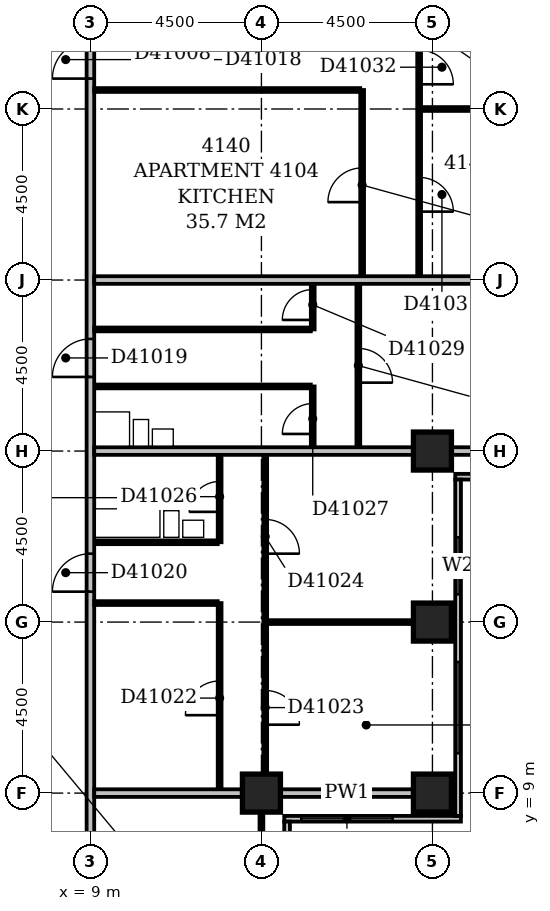
"""IFC4 building model, lengths in metres.
Left out: names, types, materials, properties, quantities, classifications, styles, units other than length and angle.
Written with IfcOpenShell. Run it as: python <this file> out.ifc"""

import sys

from ifc_helpers import new_model, si_unit, direction, frame, frame_2d, origin, origin_2d, place, context, subcontext, project, spatial, rectangle, extrude, element, fill, save


model = new_model("IFC4")
c1 = context("Model", 3, precision=1e-05, world=origin(), true_north=direction((0.0, 1.0)))
c2 = subcontext(c1, "Body", "Model", "MODEL_VIEW")
j1 = project(units=[si_unit("LENGTHUNIT", "METRE"), si_unit("PLANEANGLEUNIT", "RADIAN")], contexts=[c1])
p1 = place(None, origin())
s1 = spatial("IfcSite", under=j1, at=p1, CompositionType="ELEMENT")
p2 = place(p1, origin())
s2 = spatial("IfcBuilding", under=s1, at=p2, CompositionType="ELEMENT")
p3 = place(p2, frame((0.0, 0.0, 162.8)))
s3 = spatial("IfcBuildingStorey", under=s2, at=p3, CompositionType="ELEMENT", Elevation=162.8)
for number, where, z_axis, x_axis in (
    (1, (13.5, 9.0, -0.3), (0.0, 0.0, 1.0), (1.0, 0.0, 0.0)),
    (2, (18.0, 9.0, -0.3), (0.0, 0.0, 1.0), (1.0, 0.0, 0.0)),
    (3, (18.0, 13.5, -0.3), (0.0, 0.0, 1.0), (1.0, 0.0, 0.0)),
    (4, (18.0, 18.0, -0.3), (0.0, 0.0, 1.0), (1.0, 0.0, 0.0)),
):
    element("IfcColumn", number, at=place(p3, frame(where, z_axis=z_axis, x_axis=x_axis)), inside=s3, PredefinedType="COLUMN", context=c2, shape_type="SweptSolid", body=[
        extrude(rectangle(XDim=1.0, YDim=1.0, at=origin_2d()), origin(), (0.0, 0.0, 1.0), 3.6),
    ])
p4 = place(p3, frame((14.175, 3.9, 0.0), z_axis=(0.0, 0.0, 1.0), x_axis=(0.0, 1.0, 0.0)))
e5 = element("IfcWall", 5, at=p4, inside=s3, PredefinedType="STANDARD", context=c2, shape_type="SweptSolid", body=[
    extrude(rectangle(XDim=4.35, YDim=0.15, at=frame_2d((2.175, 0.0))), origin(), (0.0, 0.0, 1.0), 2.7),
])
p5 = place(p4, frame((1.65, 0.0, 0.6)))
e6 = element("IfcOpeningElement", 6, at=p5, cuts=e5, PredefinedType="OPENING", context=c2, shape_type="SweptSolid", body=[
    extrude(rectangle(XDim=2.4, YDim=1.8, at=frame_2d((1.2, 0.9))), frame((0.0, 0.087, 0.0), z_axis=(0.0, -1.0, 0.0), x_axis=(1.0, 0.0, 0.0)), (0.0, 0.0, 1.0), 0.174),
])
p6 = place(p3, frame((14.1, 8.325, 0.0), z_axis=(0.0, 0.0, 1.0), x_axis=(1.0, 0.0, 0.0)))
e7 = element("IfcWall", 7, at=p6, inside=s3, PredefinedType="STANDARD", context=c2, shape_type="SweptSolid", body=[
    extrude(rectangle(XDim=4.65, YDim=0.15, at=frame_2d((2.325, 0.0))), origin(), (0.0, 0.0, 1.0), 2.7),
])
p7 = place(p6, frame((0.45, 0.0, 0.6)))
e8 = element("IfcOpeningElement", 8, at=p7, cuts=e7, PredefinedType="OPENING", context=c2, shape_type="SweptSolid", body=[
    extrude(rectangle(XDim=2.4, YDim=1.8, at=frame_2d((1.2, 0.9))), frame((0.0, 0.087, 0.0), z_axis=(0.0, -1.0, 0.0), x_axis=(1.0, 0.0, 0.0)), (0.0, 0.0, 1.0), 0.174),
])
p8 = place(p3, frame((18.675, 8.4, 0.0), z_axis=(0.0, 0.0, 1.0), x_axis=(0.0, 1.0, 0.0)))
e9 = element("IfcWall", 9, at=p8, inside=s3, PredefinedType="STANDARD", context=c2, shape_type="SweptSolid", body=[
    extrude(rectangle(XDim=8.85, YDim=0.15, at=frame_2d((4.425, 0.0))), origin(), (0.0, 0.0, 1.0), 2.7),
])
p9 = place(p8, frame((1.65, 0.0, 0.6)))
e10 = element("IfcOpeningElement", 10, at=p9, cuts=e9, PredefinedType="OPENING", context=c2, shape_type="SweptSolid", body=[
    extrude(rectangle(XDim=2.4, YDim=1.8, at=frame_2d((1.2, 0.9))), frame((0.0, 0.087, 0.0), z_axis=(0.0, -1.0, 0.0), x_axis=(1.0, 0.0, 0.0)), (0.0, 0.0, 1.0), 0.174),
])
p10 = place(p8, frame((5.83, 0.0, 0.6)))
e11 = element("IfcOpeningElement", 11, at=p10, cuts=e9, PredefinedType="OPENING", context=c2, shape_type="SweptSolid", body=[
    extrude(rectangle(XDim=1.5, YDim=1.8, at=frame_2d((0.75, 0.9))), frame((0.0, 0.087, 0.0), z_axis=(0.0, -1.0, 0.0), x_axis=(1.0, 0.0, 0.0)), (0.0, 0.0, 1.0), 0.174),
])
p11 = place(p3, frame((18.6, 17.325, 0.0), z_axis=(0.0, 0.0, 1.0), x_axis=(1.0, 0.0, 0.0)))
e12 = element("IfcWall", 12, at=p11, inside=s3, PredefinedType="STANDARD", context=c2, shape_type="SweptSolid", body=[
    extrude(rectangle(XDim=4.65, YDim=0.15, at=frame_2d((2.325, 0.0))), origin(), (0.0, 0.0, 1.0), 2.7),
])
p12 = place(p11, frame((0.706, 0.0, 0.6)))
e13 = element("IfcOpeningElement", 13, at=p12, cuts=e12, PredefinedType="OPENING", context=c2, shape_type="SweptSolid", body=[
    extrude(rectangle(XDim=2.4, YDim=1.8, at=frame_2d((1.2, 0.9))), frame((0.0, 0.087, 0.0), z_axis=(0.0, -1.0, 0.0), x_axis=(1.0, 0.0, 0.0)), (0.0, 0.0, 1.0), 0.174),
])
p13 = place(p3, frame((9.0, 5.0, 0.0), z_axis=(0.0, 0.0, 1.0), x_axis=(0.0, 1.0, 0.0)))
e14 = element("IfcWall", 14, at=p13, inside=s3, PredefinedType="PARTITIONING", context=c2, shape_type="SweptSolid", body=[
    extrude(rectangle(XDim=27.75, YDim=0.2, at=frame_2d((13.875, 0.0))), origin(), (0.0, 0.0, 1.0), 3.3),
])
p14 = place(p13, frame((22.8, 0.0, 0.0)))
e15 = element("IfcOpeningElement", 15, at=p14, cuts=e14, PredefinedType="OPENING", context=c2, shape_type="SweptSolid", body=[
    extrude(rectangle(XDim=1.0, YDim=2.1, at=frame_2d((0.5, 1.05))), frame((0.0, 0.112, 0.0), z_axis=(0.0, -1.0, 0.0), x_axis=(1.0, 0.0, 0.0)), (0.0, 0.0, 1.0), 0.224),
])
p15 = place(p13, frame((14.95, 0.0, 0.0)))
e16 = element("IfcOpeningElement", 16, at=p15, cuts=e14, PredefinedType="OPENING", context=c2, shape_type="SweptSolid", body=[
    extrude(rectangle(XDim=1.0, YDim=2.1, at=frame_2d((0.5, 1.05))), frame((0.0, 0.112, 0.0), z_axis=(0.0, -1.0, 0.0), x_axis=(1.0, 0.0, 0.0)), (0.0, 0.0, 1.0), 0.224),
])
p16 = place(p13, frame((9.3, 0.0, 0.0)))
e17 = element("IfcOpeningElement", 17, at=p16, cuts=e14, PredefinedType="OPENING", context=c2, shape_type="SweptSolid", body=[
    extrude(rectangle(XDim=1.0, YDim=2.1, at=frame_2d((0.5, 1.05))), frame((0.0, 0.112, 0.0), z_axis=(0.0, -1.0, 0.0), x_axis=(1.0, 0.0, 0.0)), (0.0, 0.0, 1.0), 0.224),
])
p17 = place(p13, frame((1.5, 0.0, 0.0)))
e18 = element("IfcOpeningElement", 18, at=p17, cuts=e14, PredefinedType="OPENING", context=c2, shape_type="SweptSolid", body=[
    extrude(rectangle(XDim=0.9, YDim=2.1, at=frame_2d((0.45, 1.05))), frame((0.0, 0.112, 0.0), z_axis=(0.0, -1.0, 0.0), x_axis=(1.0, 0.0, 0.0)), (0.0, 0.0, 1.0), 0.224),
])
p18 = place(p3, frame((13.5, 5.0, 0.0), z_axis=(0.0, 0.0, 1.0), x_axis=(0.0, 1.0, 0.0)))
e19 = element("IfcWall", 19, at=p18, inside=s3, PredefinedType="PARTITIONING", context=c2, shape_type="SweptSolid", body=[
    extrude(rectangle(XDim=3.5, YDim=0.1, at=frame_2d((1.75, 0.0))), origin(), (0.0, 0.0, 1.0), 2.7),
])
p19 = place(p3, frame((9.1, 9.0, 0.0), z_axis=(0.0, 0.0, 1.0), x_axis=(1.0, 0.0, 0.0)))
e20 = element("IfcWall", 20, at=p19, inside=s3, PredefinedType="PARTITIONING", context=c2, shape_type="SweptSolid", body=[
    extrude(rectangle(XDim=3.9, YDim=0.2, at=frame_2d((1.95, 0.0))), origin(), (0.0, 0.0, 1.0), 3.3),
])
p20 = place(p3, frame((14.0, 9.0, 0.0), z_axis=(0.0, 0.0, 1.0), x_axis=(1.0, 0.0, 0.0)))
e21 = element("IfcWall", 21, at=p20, inside=s3, PredefinedType="PARTITIONING", context=c2, shape_type="SweptSolid", body=[
    extrude(rectangle(XDim=3.5, YDim=0.2, at=frame_2d((1.75, 0.0))), origin(), (0.0, 0.0, 1.0), 2.7),
])
p21 = place(p3, frame((12.4, 9.1, 0.0), z_axis=(0.0, 0.0, 1.0), x_axis=(0.0, 1.0, 0.0)))
e22 = element("IfcWall", 22, at=p21, inside=s3, PredefinedType="PARTITIONING", context=c2, shape_type="SweptSolid", body=[
    extrude(rectangle(XDim=4.9, YDim=0.1, at=frame_2d((2.45, 0.0))), origin(), (0.0, 0.0, 1.0), 3.3),
])
p22 = place(p21, frame((1.95, 0.0, 0.0)))
e23 = element("IfcOpeningElement", 23, at=p22, cuts=e22, PredefinedType="OPENING", context=c2, shape_type="SweptSolid", body=[
    extrude(rectangle(XDim=0.9, YDim=2.1, at=frame_2d((0.45, 1.05))), frame((0.0, 0.062, 0.0), z_axis=(0.0, -1.0, 0.0), x_axis=(1.0, 0.0, 0.0)), (0.0, 0.0, 1.0), 0.124),
])
p23 = place(p3, frame((13.6, 9.5, 0.0), z_axis=(0.0, 0.0, 1.0), x_axis=(0.0, 1.0, 0.0)))
e24 = element("IfcWall", 24, at=p23, inside=s3, PredefinedType="PARTITIONING", context=c2, shape_type="SweptSolid", body=[
    extrude(rectangle(XDim=8.4, YDim=0.1, at=frame_2d((4.2, 0.0))), origin(), (0.0, 0.0, 1.0), 3.3),
])
p24 = place(p23, frame((1.3, 0.0, 0.0)))
e25 = element("IfcOpeningElement", 25, at=p24, cuts=e24, PredefinedType="OPENING", context=c2, shape_type="SweptSolid", body=[
    extrude(rectangle(XDim=0.9, YDim=2.1, at=frame_2d((0.45, 1.05))), frame((0.0, 0.062, 0.0), z_axis=(0.0, -1.0, 0.0), x_axis=(1.0, 0.0, 0.0)), (0.0, 0.0, 1.0), 0.124),
])
p25 = place(p23, frame((5.8, 0.0, 0.0)))
e26 = element("IfcOpeningElement", 26, at=p25, cuts=e24, PredefinedType="OPENING", context=c2, shape_type="SweptSolid", body=[
    extrude(rectangle(XDim=0.9, YDim=2.1, at=frame_2d((0.45, 1.05))), frame((0.0, 0.062, 0.0), z_axis=(0.0, -1.0, 0.0), x_axis=(1.0, 0.0, 0.0)), (0.0, 0.0, 1.0), 0.124),
])
p26 = place(p3, frame((13.65, 13.5, 0.0), z_axis=(0.0, 0.0, 1.0), x_axis=(1.0, 0.0, 0.0)))
e27 = element("IfcWall", 27, at=p26, inside=s3, PredefinedType="PARTITIONING", context=c2, shape_type="SweptSolid", body=[
    extrude(rectangle(XDim=3.85, YDim=0.1, at=frame_2d((1.925, 0.0))), origin(), (0.0, 0.0, 1.0), 3.3),
])
p27 = place(p3, frame((9.1, 14.0, 0.0), z_axis=(0.0, 0.0, 1.0), x_axis=(1.0, 0.0, 0.0)))
e28 = element("IfcWall", 28, at=p27, inside=s3, PredefinedType="PARTITIONING", context=c2, shape_type="SweptSolid", body=[
    extrude(rectangle(XDim=3.25, YDim=0.1, at=frame_2d((1.625, 0.0))), origin(), (0.0, 0.0, 1.0), 3.3),
])
p28 = place(p3, frame((9.1, 15.6, 0.0), z_axis=(0.0, 0.0, 1.0), x_axis=(1.0, 0.0, 0.0)))
e29 = element("IfcWall", 29, at=p28, inside=s3, PredefinedType="PLUMBINGWALL", context=c2, shape_type="SweptSolid", body=[
    extrude(rectangle(XDim=3.25, YDim=0.1, at=frame_2d((1.625, 0.0))), origin(), (0.0, 0.0, 1.0), 3.3),
])
p29 = place(p3, frame((12.4, 15.6, 0.0), z_axis=(0.0, 0.0, 1.0), x_axis=(0.0, 1.0, 0.0)))
e30 = element("IfcWall", 30, at=p29, inside=s3, PredefinedType="PARTITIONING", context=c2, shape_type="SweptSolid", body=[
    extrude(rectangle(XDim=2.3, YDim=0.1, at=frame_2d((1.15, 0.0))), origin(), (0.0, 0.0, 1.0), 3.3),
])
p30 = place(p29, frame((0.8, 0.0, 0.0)))
e31 = element("IfcOpeningElement", 31, at=p30, cuts=e30, PredefinedType="OPENING", context=c2, shape_type="SweptSolid", body=[
    extrude(rectangle(XDim=0.8, YDim=2.1, at=frame_2d((0.4, 1.05))), frame((0.0, 0.062, 0.0), z_axis=(0.0, -1.0, 0.0), x_axis=(1.0, 0.0, 0.0)), (0.0, 0.0, 1.0), 0.124),
])
p31 = place(p3, frame((9.1, 18.0, 0.0), z_axis=(0.0, 0.0, 1.0), x_axis=(1.0, 0.0, 0.0)))
e32 = element("IfcWall", 32, at=p31, inside=s3, PredefinedType="PARTITIONING", context=c2, shape_type="SweptSolid", body=[
    extrude(rectangle(XDim=8.4, YDim=0.2, at=frame_2d((4.2, 0.0))), origin(), (0.0, 0.0, 1.0), 2.6),
])
p32 = place(p3, frame((18.5, 18.0, 0.0), z_axis=(0.0, 0.0, 1.0), x_axis=(1.0, 0.0, 0.0)))
e33 = element("IfcWall", 33, at=p32, inside=s3, PredefinedType="PARTITIONING", context=c2, shape_type="SweptSolid", body=[
    extrude(rectangle(XDim=3.5, YDim=0.2, at=frame_2d((1.75, 0.0))), origin(), (0.0, 0.0, 1.0), 2.7),
])
p33 = place(p3, frame((14.85, 18.1, 0.0), z_axis=(0.0, 0.0, 1.0), x_axis=(0.0, 1.0, 0.0)))
e34 = element("IfcWall", 34, at=p33, inside=s3, PredefinedType="PARTITIONING", context=c2, shape_type="SweptSolid", body=[
    extrude(rectangle(XDim=1.6, YDim=0.1, at=frame_2d((0.8, 0.0))), origin(), (0.0, 0.0, 1.0), 3.3),
])
p34 = place(p33, frame((0.35, 0.0, 0.0)))
e35 = element("IfcOpeningElement", 35, at=p34, cuts=e34, PredefinedType="OPENING", context=c2, shape_type="SweptSolid", body=[
    extrude(rectangle(XDim=0.8, YDim=2.1, at=frame_2d((0.4, 1.05))), frame((0.0, 0.062, 0.0), z_axis=(0.0, -1.0, 0.0), x_axis=(1.0, 0.0, 0.0)), (0.0, 0.0, 1.0), 0.124),
])
p35 = place(p3, frame((16.05, 18.1, 0.0), z_axis=(0.0, 0.0, 1.0), x_axis=(0.0, 1.0, 0.0)))
e36 = element("IfcWall", 36, at=p35, inside=s3, PredefinedType="PARTITIONING", context=c2, shape_type="SweptSolid", body=[
    extrude(rectangle(XDim=4.3, YDim=0.1, at=frame_2d((2.15, 0.0))), origin(), (0.0, 0.0, 1.0), 3.3),
])
p36 = place(p35, frame((1.7, 0.0, 0.0)))
e37 = element("IfcOpeningElement", 37, at=p36, cuts=e36, PredefinedType="OPENING", context=c2, shape_type="SweptSolid", body=[
    extrude(rectangle(XDim=0.9, YDim=2.1, at=frame_2d((0.45, 1.05))), frame((0.0, 0.062, 0.0), z_axis=(0.0, -1.0, 0.0), x_axis=(1.0, 0.0, 0.0)), (0.0, 0.0, 1.0), 0.124),
])
p37 = place(p3, frame((9.1, 19.7, 0.0), z_axis=(0.0, 0.0, 1.0), x_axis=(1.0, 0.0, 0.0)))
e38 = element("IfcWall", 38, at=p37, inside=s3, PredefinedType="PLUMBINGWALL", context=c2, shape_type="SweptSolid", body=[
    extrude(rectangle(XDim=5.7, YDim=0.1, at=frame_2d((2.85, 0.0))), origin(), (0.0, 0.0, 1.0), 3.3),
])
p38 = place(p3, frame((9.1, 21.2, 0.0), z_axis=(0.0, 0.0, 1.0), x_axis=(1.0, 0.0, 0.0)))
e39 = element("IfcWall", 39, at=p38, inside=s3, PredefinedType="PARTITIONING", context=c2, shape_type="SweptSolid", body=[
    extrude(rectangle(XDim=5.7, YDim=0.1, at=frame_2d((2.85, 0.0))), origin(), (0.0, 0.0, 1.0), 3.3),
])
p39 = place(p3, frame((14.85, 21.2, 0.0), z_axis=(0.0, 0.0, 1.0), x_axis=(0.0, 1.0, 0.0)))
e40 = element("IfcWall", 40, at=p39, inside=s3, PredefinedType="PARTITIONING", context=c2, shape_type="SweptSolid", body=[
    extrude(rectangle(XDim=1.2, YDim=0.1, at=frame_2d((0.6, 0.0))), origin(), (0.0, 0.0, 1.0), 3.3),
])
p40 = place(p39, frame((0.25, 0.0, 0.0)))
e41 = element("IfcOpeningElement", 41, at=p40, cuts=e40, PredefinedType="OPENING", context=c2, shape_type="SweptSolid", body=[
    extrude(rectangle(XDim=0.8, YDim=2.1, at=frame_2d((0.4, 1.05))), frame((0.0, 0.062, 0.0), z_axis=(0.0, -1.0, 0.0), x_axis=(1.0, 0.0, 0.0)), (0.0, 0.0, 1.0), 0.124),
])
p41 = place(p3, frame((9.1, 22.5, 0.0), z_axis=(0.0, 0.0, 1.0), x_axis=(1.0, 0.0, 0.0)))
e42 = element("IfcWall", 42, at=p41, inside=s3, PredefinedType="PARTITIONING", context=c2, shape_type="SweptSolid", body=[
    extrude(rectangle(XDim=12.9, YDim=0.2, at=frame_2d((6.45, 0.0))), origin(), (0.0, 0.0, 1.0), 3.3),
])
p42 = place(p3, frame((16.15, 22.6, 0.0), z_axis=(0.0, 0.0, 1.0), x_axis=(0.0, 1.0, 0.0)))
e43 = element("IfcWall", 43, at=p42, inside=s3, PredefinedType="PARTITIONING", context=c2, shape_type="SweptSolid", body=[
    extrude(rectangle(XDim=4.9, YDim=0.1, at=frame_2d((2.45, 0.0))), origin(), (0.0, 0.0, 1.0), 3.3),
])
p43 = place(p42, frame((1.95, 0.0, 0.0)))
e44 = element("IfcOpeningElement", 44, at=p43, cuts=e43, PredefinedType="OPENING", context=c2, shape_type="SweptSolid", body=[
    extrude(rectangle(XDim=0.9, YDim=2.1, at=frame_2d((0.45, 1.05))), frame((0.0, 0.062, 0.0), z_axis=(0.0, -1.0, 0.0), x_axis=(1.0, 0.0, 0.0)), (0.0, 0.0, 1.0), 0.124),
])
p44 = place(p3, frame((17.65, 22.6, 0.0), z_axis=(0.0, 0.0, 1.0), x_axis=(0.0, 1.0, 0.0)))
e45 = element("IfcWall", 45, at=p44, inside=s3, PredefinedType="PARTITIONING", context=c2, shape_type="SweptSolid", body=[
    extrude(rectangle(XDim=8.8, YDim=0.1, at=frame_2d((4.4, 0.0))), origin(), (0.0, 0.0, 1.0), 3.3),
])
p45 = place(p44, frame((1.7, 0.0, 0.0)))
e46 = element("IfcOpeningElement", 46, at=p45, cuts=e45, PredefinedType="OPENING", context=c2, shape_type="SweptSolid", body=[
    extrude(rectangle(XDim=0.9, YDim=2.1, at=frame_2d((0.45, 1.05))), frame((0.0, 0.062, 0.0), z_axis=(0.0, -1.0, 0.0), x_axis=(1.0, 0.0, 0.0)), (0.0, 0.0, 1.0), 0.124),
])
p46 = place(p44, frame((5.05, 0.0, 0.0)))
e47 = element("IfcOpeningElement", 47, at=p46, cuts=e45, PredefinedType="OPENING", context=c2, shape_type="SweptSolid", body=[
    extrude(rectangle(XDim=0.9, YDim=2.1, at=frame_2d((0.45, 1.05))), frame((0.0, 0.062, 0.0), z_axis=(0.0, -1.0, 0.0), x_axis=(1.0, 0.0, 0.0)), (0.0, 0.0, 1.0), 0.124),
])
p47 = place(p3, frame((17.7, 27.0, 0.0), z_axis=(0.0, 0.0, 1.0), x_axis=(1.0, 0.0, 0.0)))
e48 = element("IfcWall", 48, at=p47, inside=s3, PredefinedType="PARTITIONING", context=c2, shape_type="SweptSolid", body=[
    extrude(rectangle(XDim=4.3, YDim=0.1, at=frame_2d((2.15, 0.0))), origin(), (0.0, 0.0, 1.0), 2.7),
])
p48 = place(p3, frame((9.1, 27.5, 0.0), z_axis=(0.0, 0.0, 1.0), x_axis=(1.0, 0.0, 0.0)))
e49 = element("IfcWall", 49, at=p48, inside=s3, PredefinedType="PARTITIONING", context=c2, shape_type="SweptSolid", body=[
    extrude(rectangle(XDim=7.0, YDim=0.1, at=frame_2d((3.5, 0.0))), origin(), (0.0, 0.0, 1.0), 2.7),
])
p49 = place(p7, origin())
e50 = element("IfcWindow", 50, at=p49, inside=s3, PartitioningType="SINGLE_PANEL", PredefinedType="WINDOW", context=c2, shape_type="SweptSolid", body=[
    extrude(rectangle(XDim=2.4, YDim=1.8, at=frame_2d((1.2, 0.9))), frame((0.0, 0.03, 0.0), z_axis=(0.0, -1.0, 0.0), x_axis=(1.0, 0.0, 0.0)), (0.0, 0.0, 1.0), 0.06),
])
fill(e8, e50)
p50 = place(p9, origin())
e51 = element("IfcWindow", 51, at=p50, inside=s3, PartitioningType="SINGLE_PANEL", PredefinedType="WINDOW", context=c2, shape_type="SweptSolid", body=[
    extrude(rectangle(XDim=2.4, YDim=1.8, at=frame_2d((1.2, 0.9))), frame((0.0, 0.03, 0.0), z_axis=(0.0, -1.0, 0.0), x_axis=(1.0, 0.0, 0.0)), (0.0, 0.0, 1.0), 0.06),
])
fill(e10, e51)
p51 = place(p10, origin())
e52 = element("IfcWindow", 52, at=p51, inside=s3, PartitioningType="SINGLE_PANEL", PredefinedType="WINDOW", context=c2, shape_type="SweptSolid", body=[
    extrude(rectangle(XDim=1.5, YDim=1.8, at=frame_2d((0.75, 0.9))), frame((0.0, 0.03, 0.0), z_axis=(0.0, -1.0, 0.0), x_axis=(1.0, 0.0, 0.0)), (0.0, 0.0, 1.0), 0.06),
])
fill(e11, e52)
p52 = place(p14, origin())
e53 = element("IfcDoor", 53, at=p52, inside=s3, OperationType="SINGLE_SWING_LEFT", PredefinedType="DOOR", context=c2, shape_type="SweptSolid", body=[
    extrude(rectangle(XDim=1.0, YDim=2.1, at=frame_2d((0.5, 1.05))), frame((0.0, 0.025, 0.0), z_axis=(0.0, -1.0, 0.0), x_axis=(1.0, 0.0, 0.0)), (0.0, 0.0, 1.0), 0.05),
])
fill(e15, e53)
p53 = place(p15, origin())
e54 = element("IfcDoor", 54, at=p53, inside=s3, OperationType="SINGLE_SWING_LEFT", PredefinedType="DOOR", context=c2, shape_type="SweptSolid", body=[
    extrude(rectangle(XDim=1.0, YDim=2.1, at=frame_2d((0.5, 1.05))), frame((0.0, 0.025, 0.0), z_axis=(0.0, -1.0, 0.0), x_axis=(1.0, 0.0, 0.0)), (0.0, 0.0, 1.0), 0.05),
])
fill(e16, e54)
p54 = place(p16, origin())
e55 = element("IfcDoor", 55, at=p54, inside=s3, OperationType="SINGLE_SWING_LEFT", PredefinedType="DOOR", context=c2, shape_type="SweptSolid", body=[
    extrude(rectangle(XDim=1.0, YDim=2.1, at=frame_2d((0.5, 1.05))), frame((0.0, 0.025, 0.0), z_axis=(0.0, -1.0, 0.0), x_axis=(1.0, 0.0, 0.0)), (0.0, 0.0, 1.0), 0.05),
])
fill(e17, e55)
p55 = place(p22, origin())
e56 = element("IfcDoor", 56, at=p55, inside=s3, OperationType="SINGLE_SWING_LEFT", PredefinedType="DOOR", context=c2, shape_type="SweptSolid", body=[
    extrude(rectangle(XDim=0.9, YDim=2.1, at=frame_2d((0.45, 1.05))), frame((0.0, 0.025, 0.0), z_axis=(0.0, -1.0, 0.0), x_axis=(1.0, 0.0, 0.0)), (0.0, 0.0, 1.0), 0.05),
])
fill(e23, e56)
p56 = place(p24, frame((0.9, 0.0, 0.0), z_axis=(0.0, 0.0, 1.0), x_axis=(-1.0, 0.0, 0.0)))
e57 = element("IfcDoor", 57, at=p56, inside=s3, OperationType="SINGLE_SWING_RIGHT", PredefinedType="DOOR", context=c2, shape_type="SweptSolid", body=[
    extrude(rectangle(XDim=0.9, YDim=2.1, at=frame_2d((0.45, 1.05))), frame((0.0, 0.025, 0.0), z_axis=(0.0, -1.0, 0.0), x_axis=(1.0, 0.0, 0.0)), (0.0, 0.0, 1.0), 0.05),
])
fill(e25, e57)
p57 = place(p25, frame((0.9, 0.0, 0.0), z_axis=(0.0, 0.0, 1.0), x_axis=(-1.0, 0.0, 0.0)))
e58 = element("IfcDoor", 58, at=p57, inside=s3, OperationType="SINGLE_SWING_RIGHT", PredefinedType="DOOR", context=c2, shape_type="SweptSolid", body=[
    extrude(rectangle(XDim=0.9, YDim=2.1, at=frame_2d((0.45, 1.05))), frame((0.0, 0.025, 0.0), z_axis=(0.0, -1.0, 0.0), x_axis=(1.0, 0.0, 0.0)), (0.0, 0.0, 1.0), 0.05),
])
fill(e26, e58)
p58 = place(p30, origin())
e59 = element("IfcDoor", 59, at=p58, inside=s3, OperationType="SINGLE_SWING_LEFT", PredefinedType="DOOR", context=c2, shape_type="SweptSolid", body=[
    extrude(rectangle(XDim=0.8, YDim=2.1, at=frame_2d((0.4, 1.05))), frame((0.0, 0.025, 0.0), z_axis=(0.0, -1.0, 0.0), x_axis=(1.0, 0.0, 0.0)), (0.0, 0.0, 1.0), 0.05),
])
fill(e31, e59)
p59 = place(p34, origin())
e60 = element("IfcDoor", 60, at=p59, inside=s3, OperationType="SINGLE_SWING_LEFT", PredefinedType="DOOR", context=c2, shape_type="SweptSolid", body=[
    extrude(rectangle(XDim=0.8, YDim=2.1, at=frame_2d((0.4, 1.05))), frame((0.0, 0.025, 0.0), z_axis=(0.0, -1.0, 0.0), x_axis=(1.0, 0.0, 0.0)), (0.0, 0.0, 1.0), 0.05),
])
fill(e35, e60)
p60 = place(p36, frame((0.9, 0.0, 0.0), z_axis=(0.0, 0.0, 1.0), x_axis=(-1.0, 0.0, 0.0)))
e61 = element("IfcDoor", 61, at=p60, inside=s3, OperationType="SINGLE_SWING_RIGHT", PredefinedType="DOOR", context=c2, shape_type="SweptSolid", body=[
    extrude(rectangle(XDim=0.9, YDim=2.1, at=frame_2d((0.45, 1.05))), frame((0.0, 0.025, 0.0), z_axis=(0.0, -1.0, 0.0), x_axis=(1.0, 0.0, 0.0)), (0.0, 0.0, 1.0), 0.05),
])
fill(e37, e61)
p61 = place(p40, origin())
e62 = element("IfcDoor", 62, at=p61, inside=s3, OperationType="SINGLE_SWING_LEFT", PredefinedType="DOOR", context=c2, shape_type="SweptSolid", body=[
    extrude(rectangle(XDim=0.8, YDim=2.1, at=frame_2d((0.4, 1.05))), frame((0.0, 0.025, 0.0), z_axis=(0.0, -1.0, 0.0), x_axis=(1.0, 0.0, 0.0)), (0.0, 0.0, 1.0), 0.05),
])
fill(e41, e62)
p62 = place(p43, origin())
e63 = element("IfcDoor", 63, at=p62, inside=s3, OperationType="SINGLE_SWING_LEFT", PredefinedType="DOOR", context=c2, shape_type="SweptSolid", body=[
    extrude(rectangle(XDim=0.9, YDim=2.1, at=frame_2d((0.45, 1.05))), frame((0.0, 0.025, 0.0), z_axis=(0.0, -1.0, 0.0), x_axis=(1.0, 0.0, 0.0)), (0.0, 0.0, 1.0), 0.05),
])
fill(e44, e63)
p63 = place(p45, frame((0.9, 0.0, 0.0), z_axis=(0.0, 0.0, 1.0), x_axis=(-1.0, 0.0, 0.0)))
e64 = element("IfcDoor", 64, at=p63, inside=s3, OperationType="SINGLE_SWING_RIGHT", PredefinedType="DOOR", context=c2, shape_type="SweptSolid", body=[
    extrude(rectangle(XDim=0.9, YDim=2.1, at=frame_2d((0.45, 1.05))), frame((0.0, 0.025, 0.0), z_axis=(0.0, -1.0, 0.0), x_axis=(1.0, 0.0, 0.0)), (0.0, 0.0, 1.0), 0.05),
])
fill(e46, e64)
p64 = place(p46, frame((0.9, 0.0, 0.0), z_axis=(0.0, 0.0, 1.0), x_axis=(-1.0, 0.0, 0.0)))
e65 = element("IfcDoor", 65, at=p64, inside=s3, OperationType="SINGLE_SWING_RIGHT", PredefinedType="DOOR", context=c2, shape_type="SweptSolid", body=[
    extrude(rectangle(XDim=0.9, YDim=2.1, at=frame_2d((0.45, 1.05))), frame((0.0, 0.025, 0.0), z_axis=(0.0, -1.0, 0.0), x_axis=(1.0, 0.0, 0.0)), (0.0, 0.0, 1.0), 0.05),
])
fill(e47, e65)
save(model, sys.argv[1])
